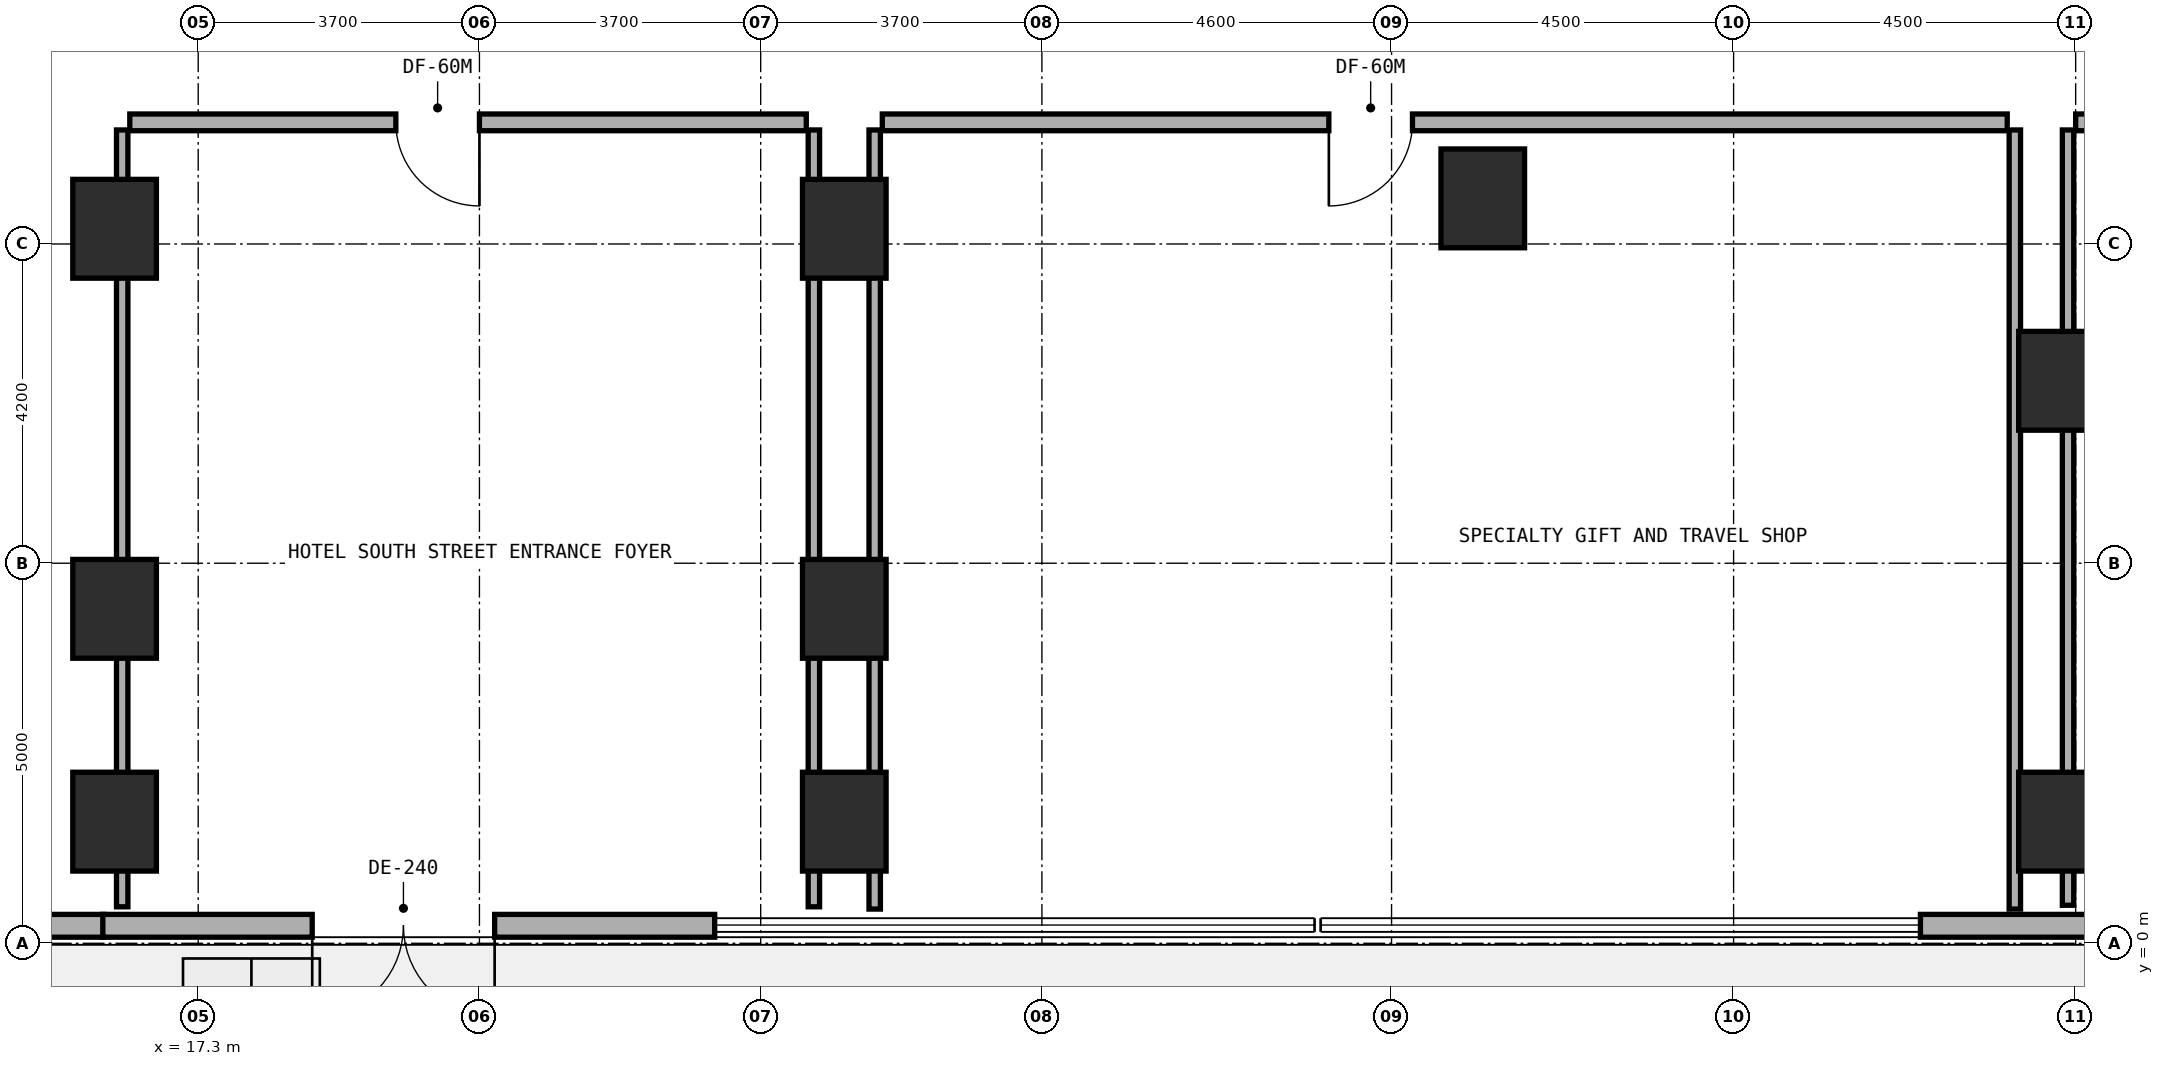
"""IFC4 building model, lengths in metres.
Left out: names, types, materials, properties, quantities, classifications, styles, units other than length and angle.
Written with IfcOpenShell. Run it as: python <this file> out.ifc"""

import sys

from ifc_helpers import new_model, si_unit, direction, frame, frame_2d, origin, origin_2d, place, context, subcontext, project, spatial, rectangle, extrude, element, fill, save


model = new_model("IFC4")
c1 = context("Model", 3, precision=1e-05, world=origin(), true_north=direction((0.0, 1.0)))
c2 = subcontext(c1, "Body", "Model", "MODEL_VIEW")
j1 = project(units=[si_unit("LENGTHUNIT", "METRE"), si_unit("PLANEANGLEUNIT", "RADIAN")], contexts=[c1])
p1 = place(None, origin())
s1 = spatial("IfcSite", under=j1, at=p1, CompositionType="ELEMENT")
p2 = place(p1, origin())
s2 = spatial("IfcBuilding", under=s1, at=p2, CompositionType="ELEMENT")
p3 = place(p2, origin())
s3 = spatial("IfcBuildingStorey", under=s2, at=p3, CompositionType="ELEMENT", Elevation=0.0)
for number, where, z_axis, x_axis in (
    (1, (16.2, 9.4, 0.0), (0.0, 0.0, 1.0), (1.0, 0.0, 0.0)),
    (2, (25.8, 9.4, 0.0), (0.0, 0.0, 1.0), (1.0, 0.0, 0.0)),
    (3, (34.2, 9.8, 0.0), (0.0, 0.0, 1.0), (1.0, 0.0, 0.0)),
    (4, (16.2, 1.6, 0.0), (0.0, 0.0, 1.0), (1.0, 0.0, 0.0)),
    (5, (25.8, 1.6, 0.0), (0.0, 0.0, 1.0), (1.0, 0.0, 0.0)),
    (6, (41.8, 1.6, 0.0), (0.0, 0.0, 1.0), (1.0, 0.0, 0.0)),
    (7, (16.2, 4.4, 0.0), (0.0, 0.0, 1.0), (1.0, 0.0, 0.0)),
    (8, (25.8, 4.4, 0.0), (0.0, 0.0, 1.0), (1.0, 0.0, 0.0)),
    (9, (41.8, 7.4, 0.0), (0.0, 0.0, 1.0), (1.0, 0.0, 0.0)),
):
    element("IfcColumn", number, at=place(p3, frame(where, z_axis=z_axis, x_axis=x_axis)), inside=s3, PredefinedType="COLUMN", context=c2, shape_type="SweptSolid", body=[
        extrude(rectangle(XDim=1.1, YDim=1.3, at=origin_2d()), origin(), (0.0, 0.0, 1.0), 5.4),
    ])
p4 = place(p3, frame((8.059, 0.23, 0.0), z_axis=(0.0, 0.0, 1.0), x_axis=(1.0, 0.0, 0.0)))
e10 = element("IfcWall", 10, at=p4, inside=s3, PredefinedType="STANDARD", context=c2, shape_type="SweptSolid", body=[
    extrude(rectangle(XDim=8.002, YDim=0.3, at=frame_2d((4.001, 0.0))), origin(), (0.0, 0.0, 1.0), 5.05),
])
p5 = place(p4, frame((4.041, 0.0, 0.0)))
e11 = element("IfcOpeningElement", 11, at=p5, cuts=e10, PredefinedType="OPENING", context=c2, shape_type="SweptSolid", body=[
    extrude(rectangle(XDim=1.4, YDim=2.2, at=frame_2d((0.7, 1.1))), frame((0.0, 0.16, 0.0), z_axis=(0.0, -1.0, 0.0), x_axis=(1.0, 0.0, 0.0)), (0.0, 0.0, 1.0), 0.32),
])
p6 = place(p3, frame((16.045, 0.23, 0.0), z_axis=(0.0, 0.0, 1.0), x_axis=(1.0, 0.0, 0.0)))
e12 = element("IfcWall", 12, at=p6, inside=s3, PredefinedType="STANDARD", context=c2, shape_type="SweptSolid", body=[
    extrude(rectangle(XDim=8.05, YDim=0.3, at=frame_2d((4.025, 0.0))), origin(), (0.0, 0.0, 1.0), 5.05),
])
p7 = place(p6, frame((2.755, 0.0, 0.0)))
e13 = element("IfcOpeningElement", 13, at=p7, cuts=e12, PredefinedType="OPENING", context=c2, shape_type="SweptSolid", body=[
    extrude(rectangle(XDim=2.4, YDim=2.6, at=frame_2d((1.2, 1.3))), frame((0.0, 0.16, 0.0), z_axis=(0.0, -1.0, 0.0), x_axis=(1.0, 0.0, 0.0)), (0.0, 0.0, 1.0), 0.32),
])
p8 = place(p3, frame((39.958, 0.23, 0.0), z_axis=(0.0, 0.0, 1.0), x_axis=(1.0, 0.0, 0.0)))
e14 = element("IfcWall", 14, at=p8, inside=s3, PredefinedType="STANDARD", context=c2, shape_type="SweptSolid", body=[
    extrude(rectangle(XDim=8.097, YDim=0.3, at=frame_2d((4.048, 0.0))), origin(), (0.0, 0.0, 1.0), 5.05),
])
p9 = place(p8, frame((2.842, 0.0, 0.0)))
e15 = element("IfcOpeningElement", 15, at=p9, cuts=e14, PredefinedType="OPENING", context=c2, shape_type="SweptSolid", body=[
    extrude(rectangle(XDim=2.4, YDim=2.6, at=frame_2d((1.2, 1.3))), frame((0.0, 0.16, 0.0), z_axis=(0.0, -1.0, 0.0), x_axis=(1.0, 0.0, 0.0)), (0.0, 0.0, 1.0), 0.32),
])
for number, where, z_axis, x_axis in (
    (16, (16.3, 0.48, 0.0), (0.0, 0.0, 1.0), (0.0, 1.0, 0.0)),
    (17, (25.4, 0.48, 0.0), (0.0, 0.0, 1.0), (0.0, 1.0, 0.0)),
):
    element("IfcWall", number, at=place(p3, frame(where, z_axis=z_axis, x_axis=x_axis)), inside=s3, PredefinedType="PARTITIONING", context=c2, shape_type="SweptSolid", body=[
        extrude(rectangle(XDim=10.22, YDim=0.15, at=frame_2d((5.11, 0.0))), origin(), (0.0, 0.0, 1.0), 4.425),
    ])
p10 = place(p3, frame((16.4, 10.8, 0.0), z_axis=(0.0, 0.0, 1.0), x_axis=(1.0, 0.0, 0.0)))
e18 = element("IfcWall", 18, at=p10, inside=s3, PredefinedType="SOLIDWALL", context=c2, shape_type="SweptSolid", body=[
    extrude(rectangle(XDim=8.9, YDim=0.22, at=frame_2d((4.45, 0.0))), origin(), (0.0, 0.0, 1.0), 5.05),
])
p11 = place(p10, frame((3.5, 0.0, 0.0)))
e19 = element("IfcOpeningElement", 19, at=p11, cuts=e18, PredefinedType="OPENING", context=c2, shape_type="SweptSolid", body=[
    extrude(rectangle(XDim=1.1, YDim=2.1, at=frame_2d((0.55, 1.05))), frame((0.0, 0.12, 0.0), z_axis=(0.0, -1.0, 0.0), x_axis=(1.0, 0.0, 0.0)), (0.0, 0.0, 1.0), 0.24),
])
p12 = place(p3, frame((26.2, 0.45, 0.0), z_axis=(0.0, 0.0, 1.0), x_axis=(0.0, 1.0, 0.0)))
e20 = element("IfcWall", 20, at=p12, inside=s3, PredefinedType="PARTITIONING", context=c2, shape_type="SweptSolid", body=[
    extrude(rectangle(XDim=10.25, YDim=0.15, at=frame_2d((5.125, 0.0))), origin(), (0.0, 0.0, 1.0), 4.125),
])
p13 = place(p3, frame((41.2, 0.45, 0.0), z_axis=(0.0, 0.0, 1.0), x_axis=(0.0, 1.0, 0.0)))
e21 = element("IfcWall", 21, at=p13, inside=s3, PredefinedType="PARTITIONING", context=c2, shape_type="SweptSolid", body=[
    extrude(rectangle(XDim=10.25, YDim=0.15, at=frame_2d((5.125, 0.0))), origin(), (0.0, 0.0, 1.0), 4.225),
])
p14 = place(p3, frame((26.3, 10.8, 0.0), z_axis=(0.0, 0.0, 1.0), x_axis=(1.0, 0.0, 0.0)))
e22 = element("IfcWall", 22, at=p14, inside=s3, PredefinedType="SOLIDWALL", context=c2, shape_type="SweptSolid", body=[
    extrude(rectangle(XDim=14.8, YDim=0.22, at=frame_2d((7.4, 0.0))), origin(), (0.0, 0.0, 1.0), 4.125),
])
p15 = place(p14, frame((5.875, 0.0, 0.0)))
e23 = element("IfcOpeningElement", 23, at=p15, cuts=e22, PredefinedType="OPENING", context=c2, shape_type="SweptSolid", body=[
    extrude(rectangle(XDim=1.1, YDim=2.1, at=frame_2d((0.55, 1.05))), frame((0.0, 0.12, 0.0), z_axis=(0.0, -1.0, 0.0), x_axis=(1.0, 0.0, 0.0)), (0.0, 0.0, 1.0), 0.24),
])
p16 = place(p3, frame((41.9, 0.5, 0.0), z_axis=(0.0, 0.0, 1.0), x_axis=(0.0, 1.0, 0.0)))
e24 = element("IfcWall", 24, at=p16, inside=s3, PredefinedType="PARTITIONING", context=c2, shape_type="SweptSolid", body=[
    extrude(rectangle(XDim=10.2, YDim=0.15, at=frame_2d((5.1, 0.0))), origin(), (0.0, 0.0, 1.0), 4.225),
])
p17 = place(p3, frame((42.0, 10.8, 0.0), z_axis=(0.0, 0.0, 1.0), x_axis=(1.0, 0.0, 0.0)))
e25 = element("IfcWall", 25, at=p17, inside=s3, PredefinedType="SOLIDWALL", context=c2, shape_type="SweptSolid", body=[
    extrude(rectangle(XDim=15.4, YDim=0.22, at=frame_2d((7.7, 0.0))), origin(), (0.0, 0.0, 1.0), 5.05),
])
p18 = place(p17, frame((6.425, 0.0, 0.0)))
e26 = element("IfcOpeningElement", 26, at=p18, cuts=e25, PredefinedType="OPENING", context=c2, shape_type="SweptSolid", body=[
    extrude(rectangle(XDim=1.1, YDim=2.1, at=frame_2d((0.55, 1.05))), frame((0.0, 0.12, 0.0), z_axis=(0.0, -1.0, 0.0), x_axis=(1.0, 0.0, 0.0)), (0.0, 0.0, 1.0), 0.24),
])
p19 = place(p7, frame((2.4, 0.0, 0.0), z_axis=(0.0, 0.0, 1.0), x_axis=(-1.0, 0.0, 0.0)))
e27 = element("IfcDoor", 27, at=p19, inside=s3, OperationType="DOUBLE_DOOR_SINGLE_SWING", PredefinedType="DOOR", context=c2, shape_type="SweptSolid", body=[
    extrude(rectangle(XDim=2.4, YDim=2.6, at=frame_2d((1.2, 1.3))), frame((0.0, 0.025, 0.0), z_axis=(0.0, -1.0, 0.0), x_axis=(1.0, 0.0, 0.0)), (0.0, 0.0, 1.0), 0.05),
])
fill(e13, e27)
p20 = place(p11, frame((1.1, 0.0, 0.0), z_axis=(0.0, 0.0, 1.0), x_axis=(-1.0, 0.0, 0.0)))
e28 = element("IfcDoor", 28, at=p20, inside=s3, OperationType="SINGLE_SWING_LEFT", PredefinedType="DOOR", context=c2, shape_type="SweptSolid", body=[
    extrude(rectangle(XDim=1.1, YDim=2.1, at=frame_2d((0.55, 1.05))), frame((0.0, 0.025, 0.0), z_axis=(0.0, -1.0, 0.0), x_axis=(1.0, 0.0, 0.0)), (0.0, 0.0, 1.0), 0.05),
])
fill(e19, e28)
p21 = place(p15, frame((1.1, 0.0, 0.0), z_axis=(0.0, 0.0, 1.0), x_axis=(-1.0, 0.0, 0.0)))
e29 = element("IfcDoor", 29, at=p21, inside=s3, OperationType="SINGLE_SWING_RIGHT", PredefinedType="DOOR", context=c2, shape_type="SweptSolid", body=[
    extrude(rectangle(XDim=1.1, YDim=2.1, at=frame_2d((0.55, 1.05))), frame((0.0, 0.025, 0.0), z_axis=(0.0, -1.0, 0.0), x_axis=(1.0, 0.0, 0.0)), (0.0, 0.0, 1.0), 0.05),
])
fill(e23, e29)
save(model, sys.argv[1])
